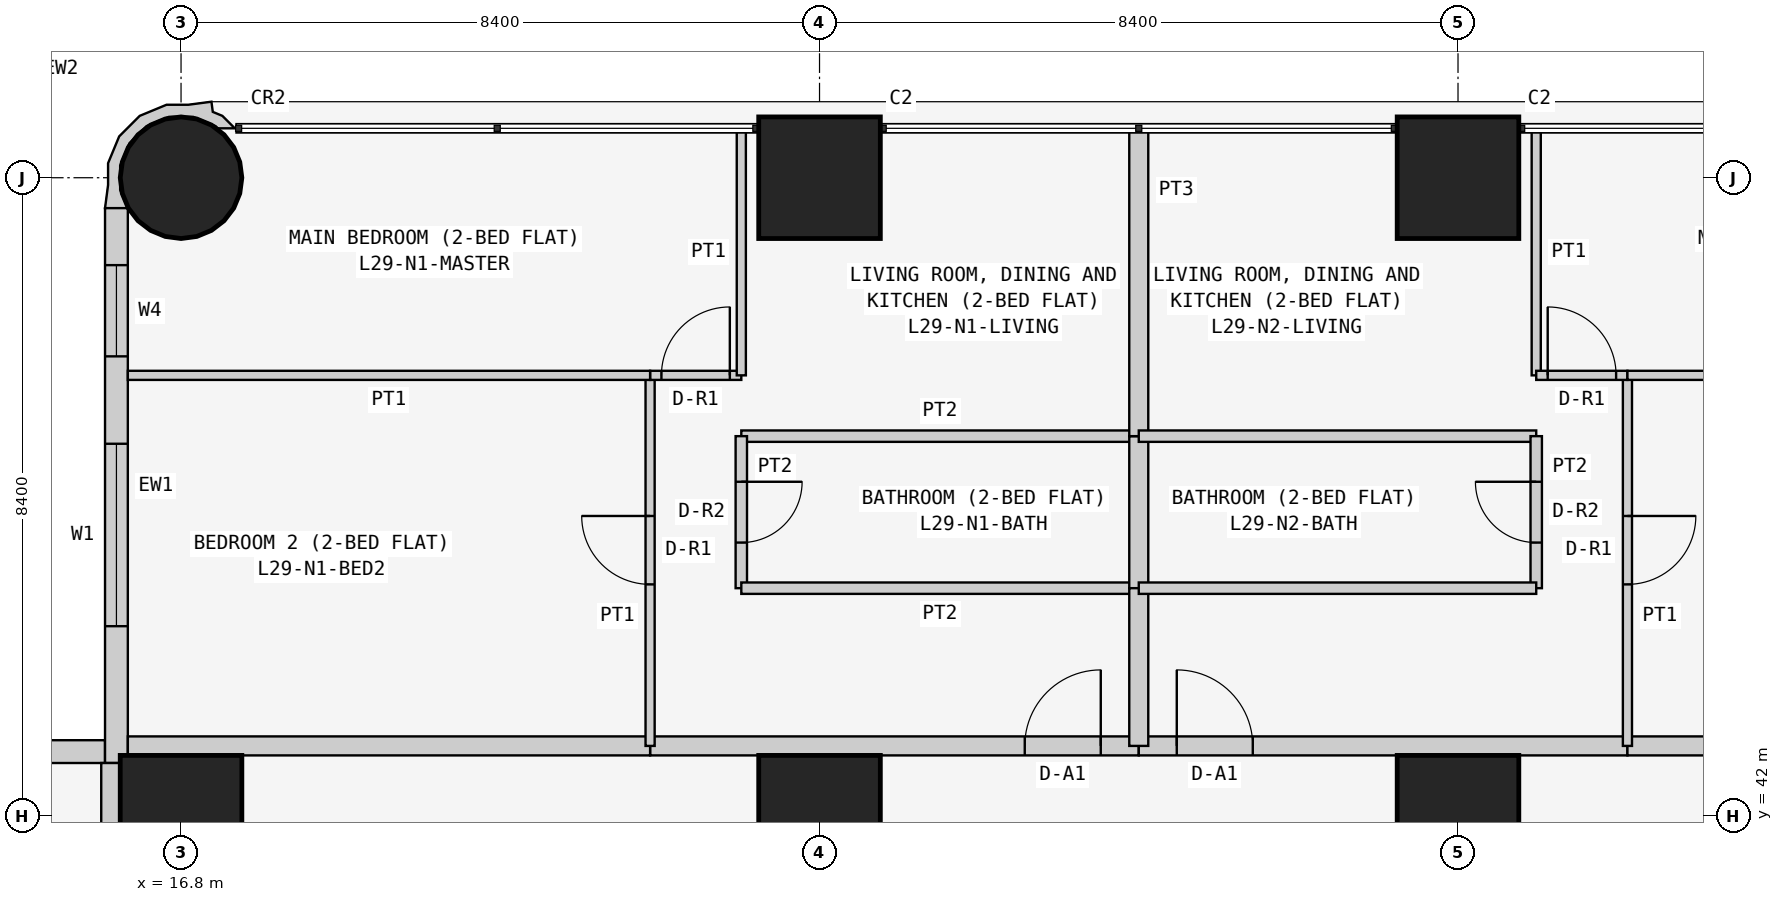
"""IFC4 building model, lengths in metres.
Left out: names, types, materials, properties, quantities, classifications, styles, units other than length and angle.
Written with IfcOpenShell. Run it as: python <this file> out.ifc"""

import sys

from ifc_helpers import new_model, si_unit, direction, frame, frame_2d, origin, origin_2d, place, context, subcontext, project, spatial, polyline, rectangle, circle, outline, extrude, element, fill, save


model = new_model("IFC4")
c1 = context("Model", 3, precision=1e-05, world=origin(), true_north=direction((0.0, 1.0)))
c2 = subcontext(c1, "Body", "Model", "MODEL_VIEW")
j1 = project(units=[si_unit("LENGTHUNIT", "METRE"), si_unit("PLANEANGLEUNIT", "RADIAN")], contexts=[c1])
p1 = place(None, origin())
s1 = spatial("IfcSite", under=j1, at=p1, CompositionType="ELEMENT")
p2 = place(p1, origin())
s2 = spatial("IfcBuilding", under=s1, at=p2, CompositionType="ELEMENT")
p3 = place(p2, frame((0.0, 0.0, 116.1)))
s3 = spatial("IfcBuildingStorey", under=s2, at=p3, CompositionType="ELEMENT", Elevation=116.1)
p4 = place(p3, frame((16.8, 42.0, 0.0), z_axis=(0.0, 0.0, 1.0), x_axis=(1.0, 0.0, 0.0)))
e1 = element("IfcColumn", 1, at=p4, inside=s3, PredefinedType="COLUMN", context=c2, shape_type="SweptSolid", body=[
    extrude(rectangle(XDim=1.6, YDim=1.6, at=origin_2d()), origin(), (0.0, 0.0, 1.0), 3.6),
])
p5 = place(p3, frame((16.8, 50.4, 0.0), z_axis=(0.0, 0.0, 1.0), x_axis=(1.0, 0.0, 0.0)))
e2 = element("IfcColumn", 2, at=p5, inside=s3, PredefinedType="COLUMN", context=c2, shape_type="SweptSolid", body=[
    extrude(circle(Radius=0.8, at=origin_2d()), origin(), (0.0, 0.0, 1.0), 3.6),
])
for number, where, z_axis, x_axis in (
    (3, (25.2, 42.0, 0.0), (0.0, 0.0, 1.0), (1.0, 0.0, 0.0)),
    (4, (25.2, 50.4, 0.0), (0.0, 0.0, 1.0), (1.0, 0.0, 0.0)),
    (5, (33.6, 42.0, 0.0), (0.0, 0.0, 1.0), (1.0, 0.0, 0.0)),
    (6, (33.6, 50.4, 0.0), (0.0, 0.0, 1.0), (1.0, 0.0, 0.0)),
):
    element("IfcColumn", number, at=place(p3, frame(where, z_axis=z_axis, x_axis=x_axis)), inside=s3, PredefinedType="COLUMN", context=c2, shape_type="SweptSolid", body=[
        extrude(rectangle(XDim=1.6, YDim=1.6, at=origin_2d()), origin(), (0.0, 0.0, 1.0), 3.6),
    ])
p6 = place(p3, frame((15.8, 42.85, 0.0), z_axis=(0.0, 0.0, 1.0), x_axis=(-1.0, 0.0, 0.0)))
e7 = element("IfcWall", 7, at=p6, inside=s3, PredefinedType="SOLIDWALL", context=c2, shape_type="SweptSolid", body=[
    extrude(rectangle(XDim=15.4, YDim=0.3, at=frame_2d((7.7, 0.0))), origin(), (0.0, 0.0, 1.0), 3.45),
])
p7 = place(p6, frame((1.2, 0.0, 0.9)))
e8 = element("IfcOpeningElement", 8, at=p7, cuts=e7, PredefinedType="OPENING", context=c2, shape_type="SweptSolid", body=[
    extrude(rectangle(XDim=1.8, YDim=1.5, at=frame_2d((0.9, 0.75))), frame((0.0, 0.16, 0.0), z_axis=(0.0, -1.0, 0.0), x_axis=(1.0, 0.0, 0.0)), (0.0, 0.0, 1.0), 0.32),
])
p8 = place(p6, frame((4.95, 0.0, 1.5)))
e9 = element("IfcOpeningElement", 9, at=p8, cuts=e7, PredefinedType="OPENING", context=c2, shape_type="SweptSolid", body=[
    extrude(rectangle(XDim=0.9, YDim=0.7, at=frame_2d((0.45, 0.35))), frame((0.0, 0.16, 0.0), z_axis=(0.0, -1.0, 0.0), x_axis=(1.0, 0.0, 0.0)), (0.0, 0.0, 1.0), 0.32),
])
p9 = place(p6, frame((8.5, 0.0, 0.9)))
e10 = element("IfcOpeningElement", 10, at=p9, cuts=e7, PredefinedType="OPENING", context=c2, shape_type="SweptSolid", body=[
    extrude(rectangle(XDim=1.8, YDim=1.5, at=frame_2d((0.9, 0.75))), frame((0.0, 0.16, 0.0), z_axis=(0.0, -1.0, 0.0), x_axis=(1.0, 0.0, 0.0)), (0.0, 0.0, 1.0), 0.32),
])
p10 = place(p6, frame((12.5, 0.0, 0.0)))
e11 = element("IfcOpeningElement", 11, at=p10, cuts=e7, PredefinedType="OPENING", context=c2, shape_type="SweptSolid", body=[
    extrude(rectangle(XDim=0.9, YDim=2.4, at=frame_2d((0.45, 1.2))), frame((0.0, 0.16, 0.0), z_axis=(0.0, -1.0, 0.0), x_axis=(1.0, 0.0, 0.0)), (0.0, 0.0, 1.0), 0.32),
])
p11 = place(p6, frame((13.5, 0.0, 0.9)))
e12 = element("IfcOpeningElement", 12, at=p11, cuts=e7, PredefinedType="OPENING", context=c2, shape_type="SweptSolid", body=[
    extrude(rectangle(XDim=1.2, YDim=1.5, at=frame_2d((0.6, 0.75))), frame((0.0, 0.16, 0.0), z_axis=(0.0, -1.0, 0.0), x_axis=(1.0, 0.0, 0.0)), (0.0, 0.0, 1.0), 0.32),
])
p12 = place(p3, frame((15.95, 50.0, 0.0), z_axis=(0.0, 0.0, 1.0), x_axis=(0.0, -1.0, 0.0)))
e13 = element("IfcWall", 13, at=p12, inside=s3, PredefinedType="SOLIDWALL", context=c2, shape_type="SweptSolid", body=[
    extrude(rectangle(XDim=7.3, YDim=0.3, at=frame_2d((3.65, 0.0))), origin(), (0.0, 0.0, 1.0), 3.45),
])
p13 = place(p12, frame((3.1, 0.0, 0.9)))
e14 = element("IfcOpeningElement", 14, at=p13, cuts=e13, PredefinedType="OPENING", context=c2, shape_type="SweptSolid", body=[
    extrude(rectangle(XDim=2.4, YDim=1.5, at=frame_2d((1.2, 0.75))), frame((0.0, 0.16, 0.0), z_axis=(0.0, -1.0, 0.0), x_axis=(1.0, 0.0, 0.0)), (0.0, 0.0, 1.0), 0.32),
])
p14 = place(p12, frame((0.75, 0.0, 0.9)))
e15 = element("IfcOpeningElement", 15, at=p14, cuts=e13, PredefinedType="OPENING", context=c2, shape_type="SweptSolid", body=[
    extrude(rectangle(XDim=1.2, YDim=1.5, at=frame_2d((0.6, 0.75))), frame((0.0, 0.16, 0.0), z_axis=(0.0, -1.0, 0.0), x_axis=(1.0, 0.0, 0.0)), (0.0, 0.0, 1.0), 0.32),
])
p15 = place(p3, frame((17.448, 50.995, 0.0), z_axis=(0.0, 0.0, 1.0), x_axis=(-0.343276641956, 0.93923434088, 0.0)))
e16 = element("IfcWall", 16, at=p15, inside=s3, PredefinedType="SOLIDWALL", context=c2, shape_type="SweptSolid", body=[
    extrude(outline(polyline([(0.241, 0.023), (0.333, 0.124), (0.465, 0.094), (0.532, 0.393), (0.631, 0.663), (0.614, 1.045), (0.454, 1.391), (0.172, 1.649), (-0.098, 1.748), (-0.369, 1.89), (-0.509, 1.621), (-0.491, 1.615), (-0.479, 1.609), (-0.211, 1.62), (0.088, 1.511), (0.323, 1.295), (0.457, 1.006), (0.47, 0.688), (0.361, 0.389), (0.145, 0.154), (0.108, 0.137), (0.031, -0.075), (0.241, 0.023)])), origin(), (0.0, 0.0, 1.0), 3.45),
])
p16 = place(p3, frame((22.971, 42.925, 0.0), z_axis=(0.0, 0.0, 1.0), x_axis=(1.0, 0.0, 0.0)))
e17 = element("IfcWall", 17, at=p16, inside=s3, PredefinedType="PARTITIONING", context=c2, shape_type="SweptSolid", body=[
    extrude(rectangle(XDim=6.429, YDim=0.25, at=frame_2d((3.214, 0.0))), origin(), (0.0, 0.0, 1.0), 3.45),
])
p17 = place(p16, frame((4.929, 0.0, 0.0)))
e18 = element("IfcOpeningElement", 18, at=p17, cuts=e17, PredefinedType="OPENING", context=c2, shape_type="SweptSolid", body=[
    extrude(rectangle(XDim=1.0, YDim=2.1, at=frame_2d((0.5, 1.05))), frame((0.0, 0.135, 0.0), z_axis=(0.0, -1.0, 0.0), x_axis=(1.0, 0.0, 0.0)), (0.0, 0.0, 1.0), 0.27),
])
p18 = place(p3, frame((16.1, 42.925, 0.0), z_axis=(0.0, 0.0, 1.0), x_axis=(1.0, 0.0, 0.0)))
e19 = element("IfcWall", 19, at=p18, inside=s3, PredefinedType="PARTITIONING", context=c2, shape_type="SweptSolid", body=[
    extrude(rectangle(XDim=6.871, YDim=0.25, at=frame_2d((3.436, 0.0))), origin(), (0.0, 0.0, 1.0), 3.45),
])
p19 = place(p3, frame((29.4, 42.925, 0.0), z_axis=(0.0, 0.0, 1.0), x_axis=(1.0, 0.0, 0.0)))
e20 = element("IfcWall", 20, at=p19, inside=s3, PredefinedType="PARTITIONING", context=c2, shape_type="SweptSolid", body=[
    extrude(rectangle(XDim=6.429, YDim=0.25, at=frame_2d((3.215, 0.0))), origin(), (0.0, 0.0, 1.0), 3.45),
])
p20 = place(p19, frame((0.5, 0.0, 0.0)))
e21 = element("IfcOpeningElement", 21, at=p20, cuts=e20, PredefinedType="OPENING", context=c2, shape_type="SweptSolid", body=[
    extrude(rectangle(XDim=1.0, YDim=2.1, at=frame_2d((0.5, 1.05))), frame((0.0, 0.135, 0.0), z_axis=(0.0, -1.0, 0.0), x_axis=(1.0, 0.0, 0.0)), (0.0, 0.0, 1.0), 0.27),
])
p21 = place(p3, frame((35.829, 42.925, 0.0), z_axis=(0.0, 0.0, 1.0), x_axis=(1.0, 0.0, 0.0)))
e22 = element("IfcWall", 22, at=p21, inside=s3, PredefinedType="PARTITIONING", context=c2, shape_type="SweptSolid", body=[
    extrude(rectangle(XDim=6.871, YDim=0.25, at=frame_2d((3.436, 0.0))), origin(), (0.0, 0.0, 1.0), 3.45),
])
p22 = place(p3, frame((15.875, 36.229, 0.0), z_axis=(0.0, 0.0, 1.0), x_axis=(0.0, 1.0, 0.0)))
e23 = element("IfcWall", 23, at=p22, inside=s3, PredefinedType="PARTITIONING", context=c2, shape_type="SweptSolid", body=[
    extrude(rectangle(XDim=6.471, YDim=0.25, at=frame_2d((3.235, 0.0))), origin(), (0.0, 0.0, 1.0), 3.45),
])
p23 = place(p3, frame((29.4, 47.0, 0.0), z_axis=(0.0, 0.0, 1.0), x_axis=(-1.0, 0.0, 0.0)))
e24 = element("IfcWall", 24, at=p23, inside=s3, PredefinedType="PARTITIONING", context=c2, shape_type="SweptSolid", body=[
    extrude(rectangle(XDim=5.229, YDim=0.15, at=frame_2d((2.615, 0.0))), origin(), (0.0, 0.0, 1.0), 3.45),
])
p24 = place(p3, frame((24.171, 47.0, 0.0), z_axis=(0.0, 0.0, 1.0), x_axis=(0.0, -1.0, 0.0)))
e25 = element("IfcWall", 25, at=p24, inside=s3, PredefinedType="PARTITIONING", context=c2, shape_type="SweptSolid", body=[
    extrude(rectangle(XDim=2.0, YDim=0.15, at=frame_2d((1.0, 0.0))), origin(), (0.0, 0.0, 1.0), 3.45),
])
p25 = place(p24, frame((0.6, 0.0, 0.0)))
e26 = element("IfcOpeningElement", 26, at=p25, cuts=e25, PredefinedType="OPENING", context=c2, shape_type="SweptSolid", body=[
    extrude(rectangle(XDim=0.8, YDim=2.1, at=frame_2d((0.4, 1.05))), frame((0.0, 0.085, 0.0), z_axis=(0.0, -1.0, 0.0), x_axis=(1.0, 0.0, 0.0)), (0.0, 0.0, 1.0), 0.17),
])
p26 = place(p3, frame((24.171, 45.0, 0.0), z_axis=(0.0, 0.0, 1.0), x_axis=(1.0, 0.0, 0.0)))
e27 = element("IfcWall", 27, at=p26, inside=s3, PredefinedType="PARTITIONING", context=c2, shape_type="SweptSolid", body=[
    extrude(rectangle(XDim=5.229, YDim=0.15, at=frame_2d((2.615, 0.0))), origin(), (0.0, 0.0, 1.0), 3.45),
])
p27 = place(p3, frame((29.4, 45.0, 0.0), z_axis=(0.0, 0.0, 1.0), x_axis=(0.0, 1.0, 0.0)))
e28 = element("IfcWall", 28, at=p27, inside=s3, PredefinedType="PARTITIONING", context=c2, shape_type="SweptSolid", body=[
    extrude(rectangle(XDim=2.0, YDim=0.25, at=frame_2d((1.0, 0.0))), origin(), (0.0, 0.0, 1.0), 2.848),
])
p28 = place(p3, frame((22.971, 42.925, 0.0), z_axis=(0.0, 0.0, 1.0), x_axis=(0.0, 1.0, 0.0)))
e29 = element("IfcWall", 29, at=p28, inside=s3, PredefinedType="PARTITIONING", context=c2, shape_type="SweptSolid", body=[
    extrude(rectangle(XDim=4.875, YDim=0.12, at=frame_2d((2.438, 0.0))), origin(), (0.0, 0.0, 1.0), 3.45),
])
p29 = place(p28, frame((2.125, 0.0, 0.0)))
e30 = element("IfcOpeningElement", 30, at=p29, cuts=e29, PredefinedType="OPENING", context=c2, shape_type="SweptSolid", body=[
    extrude(rectangle(XDim=0.9, YDim=2.1, at=frame_2d((0.45, 1.05))), frame((0.0, 0.07, 0.0), z_axis=(0.0, -1.0, 0.0), x_axis=(1.0, 0.0, 0.0)), (0.0, 0.0, 1.0), 0.14),
])
p30 = place(p3, frame((22.971, 47.8, 0.0), z_axis=(0.0, 0.0, 1.0), x_axis=(1.0, 0.0, 0.0)))
e31 = element("IfcWall", 31, at=p30, inside=s3, PredefinedType="PARTITIONING", context=c2, shape_type="SweptSolid", body=[
    extrude(rectangle(XDim=1.2, YDim=0.12, at=frame_2d((0.6, 0.0))), origin(), (0.0, 0.0, 1.0), 3.45),
])
p31 = place(p30, frame((0.149, 0.0, 0.0)))
e32 = element("IfcOpeningElement", 32, at=p31, cuts=e31, PredefinedType="OPENING", context=c2, shape_type="SweptSolid", body=[
    extrude(rectangle(XDim=0.9, YDim=2.1, at=frame_2d((0.45, 1.05))), frame((0.0, 0.07, 0.0), z_axis=(0.0, -1.0, 0.0), x_axis=(1.0, 0.0, 0.0)), (0.0, 0.0, 1.0), 0.14),
])
p32 = place(p3, frame((24.171, 47.8, 0.0), z_axis=(0.0, 0.0, 1.0), x_axis=(0.0, 1.0, 0.0)))
e33 = element("IfcWall", 33, at=p32, inside=s3, PredefinedType="PARTITIONING", context=c2, shape_type="SweptSolid", body=[
    extrude(rectangle(XDim=3.25, YDim=0.12, at=frame_2d((1.625, 0.0))), origin(), (0.0, 0.0, 1.0), 3.45),
])
p33 = place(p3, frame((29.4, 45.0, 0.0), z_axis=(0.0, 0.0, 1.0), x_axis=(0.0, -1.0, 0.0)))
e34 = element("IfcWall", 34, at=p33, inside=s3, PredefinedType="PARTITIONING", context=c2, shape_type="SweptSolid", body=[
    extrude(rectangle(XDim=2.075, YDim=0.25, at=frame_2d((1.038, 0.0))), origin(), (0.0, 0.0, 1.0), 2.848),
])
p34 = place(p3, frame((29.4, 51.05, 0.0), z_axis=(0.0, 0.0, 1.0), x_axis=(0.0, -1.0, 0.0)))
e35 = element("IfcWall", 35, at=p34, inside=s3, PredefinedType="PARTITIONING", context=c2, shape_type="SweptSolid", body=[
    extrude(rectangle(XDim=4.05, YDim=0.25, at=frame_2d((2.025, 0.0))), origin(), (0.0, 0.0, 1.0), 2.848),
])
p35 = place(p3, frame((22.971, 47.8, 0.0), z_axis=(0.0, 0.0, 1.0), x_axis=(-1.0, 0.0, 0.0)))
e36 = element("IfcWall", 36, at=p35, inside=s3, PredefinedType="PARTITIONING", context=c2, shape_type="SweptSolid", body=[
    extrude(rectangle(XDim=6.871, YDim=0.12, at=frame_2d((3.436, 0.0))), origin(), (0.0, 0.0, 1.0), 3.45),
])
p36 = place(p3, frame((29.4, 47.0, 0.0), z_axis=(0.0, 0.0, 1.0), x_axis=(1.0, 0.0, 0.0)))
e37 = element("IfcWall", 37, at=p36, inside=s3, PredefinedType="PARTITIONING", context=c2, shape_type="SweptSolid", body=[
    extrude(rectangle(XDim=5.229, YDim=0.15, at=frame_2d((2.615, 0.0))), origin(), (0.0, 0.0, 1.0), 3.45),
])
p37 = place(p3, frame((34.629, 47.0, 0.0), z_axis=(0.0, 0.0, 1.0), x_axis=(0.0, -1.0, 0.0)))
e38 = element("IfcWall", 38, at=p37, inside=s3, PredefinedType="PARTITIONING", context=c2, shape_type="SweptSolid", body=[
    extrude(rectangle(XDim=2.0, YDim=0.15, at=frame_2d((1.0, 0.0))), origin(), (0.0, 0.0, 1.0), 3.45),
])
p38 = place(p37, frame((0.6, 0.0, 0.0)))
e39 = element("IfcOpeningElement", 39, at=p38, cuts=e38, PredefinedType="OPENING", context=c2, shape_type="SweptSolid", body=[
    extrude(rectangle(XDim=0.8, YDim=2.1, at=frame_2d((0.4, 1.05))), frame((0.0, 0.085, 0.0), z_axis=(0.0, -1.0, 0.0), x_axis=(1.0, 0.0, 0.0)), (0.0, 0.0, 1.0), 0.17),
])
p39 = place(p3, frame((34.629, 45.0, 0.0), z_axis=(0.0, 0.0, 1.0), x_axis=(-1.0, 0.0, 0.0)))
e40 = element("IfcWall", 40, at=p39, inside=s3, PredefinedType="PARTITIONING", context=c2, shape_type="SweptSolid", body=[
    extrude(rectangle(XDim=5.229, YDim=0.15, at=frame_2d((2.615, 0.0))), origin(), (0.0, 0.0, 1.0), 3.45),
])
p40 = place(p3, frame((35.829, 47.8, 0.0), z_axis=(0.0, 0.0, 1.0), x_axis=(0.0, -1.0, 0.0)))
e41 = element("IfcWall", 41, at=p40, inside=s3, PredefinedType="PARTITIONING", context=c2, shape_type="SweptSolid", body=[
    extrude(rectangle(XDim=4.875, YDim=0.12, at=frame_2d((2.438, 0.0))), origin(), (0.0, 0.0, 1.0), 3.45),
])
p41 = place(p40, frame((1.85, 0.0, 0.0)))
e42 = element("IfcOpeningElement", 42, at=p41, cuts=e41, PredefinedType="OPENING", context=c2, shape_type="SweptSolid", body=[
    extrude(rectangle(XDim=0.9, YDim=2.1, at=frame_2d((0.45, 1.05))), frame((0.0, 0.07, 0.0), z_axis=(0.0, -1.0, 0.0), x_axis=(1.0, 0.0, 0.0)), (0.0, 0.0, 1.0), 0.14),
])
p42 = place(p3, frame((34.629, 51.05, 0.0), z_axis=(0.0, 0.0, 1.0), x_axis=(0.0, -1.0, 0.0)))
e43 = element("IfcWall", 43, at=p42, inside=s3, PredefinedType="PARTITIONING", context=c2, shape_type="SweptSolid", body=[
    extrude(rectangle(XDim=3.25, YDim=0.12, at=frame_2d((1.625, 0.0))), origin(), (0.0, 0.0, 1.0), 3.45),
])
p43 = place(p3, frame((34.629, 47.8, 0.0), z_axis=(0.0, 0.0, 1.0), x_axis=(1.0, 0.0, 0.0)))
e44 = element("IfcWall", 44, at=p43, inside=s3, PredefinedType="PARTITIONING", context=c2, shape_type="SweptSolid", body=[
    extrude(rectangle(XDim=1.2, YDim=0.12, at=frame_2d((0.6, 0.0))), origin(), (0.0, 0.0, 1.0), 3.45),
])
p44 = place(p43, frame((0.151, 0.0, 0.0)))
e45 = element("IfcOpeningElement", 45, at=p44, cuts=e44, PredefinedType="OPENING", context=c2, shape_type="SweptSolid", body=[
    extrude(rectangle(XDim=0.9, YDim=2.1, at=frame_2d((0.45, 1.05))), frame((0.0, 0.07, 0.0), z_axis=(0.0, -1.0, 0.0), x_axis=(1.0, 0.0, 0.0)), (0.0, 0.0, 1.0), 0.14),
])
p45 = place(p3, frame((35.829, 47.8, 0.0), z_axis=(0.0, 0.0, 1.0), x_axis=(1.0, 0.0, 0.0)))
e46 = element("IfcWall", 46, at=p45, inside=s3, PredefinedType="PARTITIONING", context=c2, shape_type="SweptSolid", body=[
    extrude(rectangle(XDim=6.871, YDim=0.12, at=frame_2d((3.436, 0.0))), origin(), (0.0, 0.0, 1.0), 3.45),
])
p46 = place(p13, origin())
e47 = element("IfcWindow", 47, at=p46, inside=s3, PartitioningType="SINGLE_PANEL", PredefinedType="WINDOW", context=c2, shape_type="SweptSolid", body=[
    extrude(rectangle(XDim=2.4, YDim=1.5, at=frame_2d((1.2, 0.75))), frame((0.0, 0.03, 0.0), z_axis=(0.0, -1.0, 0.0), x_axis=(1.0, 0.0, 0.0)), (0.0, 0.0, 1.0), 0.06),
])
fill(e14, e47)
p47 = place(p14, origin())
e48 = element("IfcWindow", 48, at=p47, inside=s3, PartitioningType="SINGLE_PANEL", PredefinedType="WINDOW", context=c2, shape_type="SweptSolid", body=[
    extrude(rectangle(XDim=1.2, YDim=1.5, at=frame_2d((0.6, 0.75))), frame((0.0, 0.03, 0.0), z_axis=(0.0, -1.0, 0.0), x_axis=(1.0, 0.0, 0.0)), (0.0, 0.0, 1.0), 0.06),
])
fill(e15, e48)
p48 = place(p17, origin())
e49 = element("IfcDoor", 49, at=p48, inside=s3, OperationType="SINGLE_SWING_RIGHT", PredefinedType="DOOR", context=c2, shape_type="SweptSolid", body=[
    extrude(rectangle(XDim=1.0, YDim=2.1, at=frame_2d((0.5, 1.05))), frame((0.0, 0.025, 0.0), z_axis=(0.0, -1.0, 0.0), x_axis=(1.0, 0.0, 0.0)), (0.0, 0.0, 1.0), 0.05),
])
fill(e18, e49)
p49 = place(p25, origin())
e50 = element("IfcDoor", 50, at=p49, inside=s3, OperationType="SINGLE_SWING_LEFT", PredefinedType="DOOR", context=c2, shape_type="SweptSolid", body=[
    extrude(rectangle(XDim=0.8, YDim=2.1, at=frame_2d((0.4, 1.05))), frame((0.0, 0.025, 0.0), z_axis=(0.0, -1.0, 0.0), x_axis=(1.0, 0.0, 0.0)), (0.0, 0.0, 1.0), 0.05),
])
fill(e26, e50)
p50 = place(p29, origin())
e51 = element("IfcDoor", 51, at=p50, inside=s3, OperationType="SINGLE_SWING_RIGHT", PredefinedType="DOOR", context=c2, shape_type="SweptSolid", body=[
    extrude(rectangle(XDim=0.9, YDim=2.1, at=frame_2d((0.45, 1.05))), frame((0.0, 0.025, 0.0), z_axis=(0.0, -1.0, 0.0), x_axis=(1.0, 0.0, 0.0)), (0.0, 0.0, 1.0), 0.05),
])
fill(e30, e51)
p51 = place(p31, origin())
e52 = element("IfcDoor", 52, at=p51, inside=s3, OperationType="SINGLE_SWING_RIGHT", PredefinedType="DOOR", context=c2, shape_type="SweptSolid", body=[
    extrude(rectangle(XDim=0.9, YDim=2.1, at=frame_2d((0.45, 1.05))), frame((0.0, 0.025, 0.0), z_axis=(0.0, -1.0, 0.0), x_axis=(1.0, 0.0, 0.0)), (0.0, 0.0, 1.0), 0.05),
])
fill(e32, e52)
p52 = place(p20, origin())
e53 = element("IfcDoor", 53, at=p52, inside=s3, OperationType="SINGLE_SWING_LEFT", PredefinedType="DOOR", context=c2, shape_type="SweptSolid", body=[
    extrude(rectangle(XDim=1.0, YDim=2.1, at=frame_2d((0.5, 1.05))), frame((0.0, 0.025, 0.0), z_axis=(0.0, -1.0, 0.0), x_axis=(1.0, 0.0, 0.0)), (0.0, 0.0, 1.0), 0.05),
])
fill(e21, e53)
p53 = place(p38, frame((0.8, 0.0, 0.0), z_axis=(0.0, 0.0, 1.0), x_axis=(-1.0, 0.0, 0.0)))
e54 = element("IfcDoor", 54, at=p53, inside=s3, OperationType="SINGLE_SWING_RIGHT", PredefinedType="DOOR", context=c2, shape_type="SweptSolid", body=[
    extrude(rectangle(XDim=0.8, YDim=2.1, at=frame_2d((0.4, 1.05))), frame((0.0, 0.025, 0.0), z_axis=(0.0, -1.0, 0.0), x_axis=(1.0, 0.0, 0.0)), (0.0, 0.0, 1.0), 0.05),
])
fill(e39, e54)
p54 = place(p41, origin())
e55 = element("IfcDoor", 55, at=p54, inside=s3, OperationType="SINGLE_SWING_LEFT", PredefinedType="DOOR", context=c2, shape_type="SweptSolid", body=[
    extrude(rectangle(XDim=0.9, YDim=2.1, at=frame_2d((0.45, 1.05))), frame((0.0, 0.025, 0.0), z_axis=(0.0, -1.0, 0.0), x_axis=(1.0, 0.0, 0.0)), (0.0, 0.0, 1.0), 0.05),
])
fill(e42, e55)
p55 = place(p44, origin())
e56 = element("IfcDoor", 56, at=p55, inside=s3, OperationType="SINGLE_SWING_LEFT", PredefinedType="DOOR", context=c2, shape_type="SweptSolid", body=[
    extrude(rectangle(XDim=0.9, YDim=2.1, at=frame_2d((0.45, 1.05))), frame((0.0, 0.025, 0.0), z_axis=(0.0, -1.0, 0.0), x_axis=(1.0, 0.0, 0.0)), (0.0, 0.0, 1.0), 0.05),
])
fill(e45, e56)
save(model, sys.argv[1])
